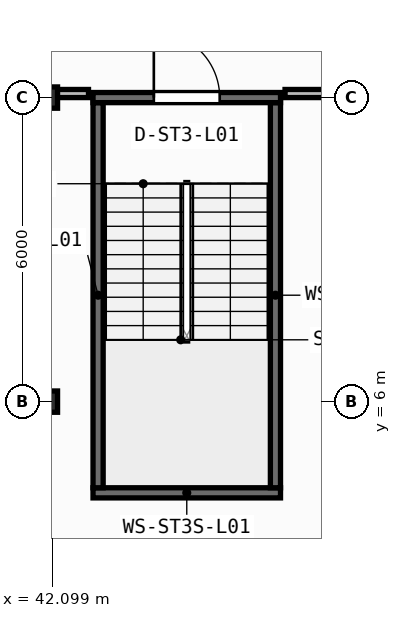
"""IFC4 building model, lengths in metres.
Left out: names, types, materials, properties, quantities, classifications, styles, units other than length and angle.
Written with IfcOpenShell. Run it as: python <this file> out.ifc"""

import sys

from ifc_helpers import new_model, si_unit, direction, frame, frame_2d, origin, origin_2d, place, context, subcontext, project, spatial, rectangle, i_section, extrude, element, fill, save


model = new_model("IFC4")
c1 = context("Model", 3, precision=1e-05, world=origin(), true_north=direction((0.0, 1.0)))
c2 = subcontext(c1, "Body", "Model", "MODEL_VIEW")
j1 = project(units=[si_unit("LENGTHUNIT", "METRE"), si_unit("PLANEANGLEUNIT", "RADIAN")], contexts=[c1])
p1 = place(None, origin())
s1 = spatial("IfcSite", under=j1, at=p1, CompositionType="ELEMENT")
p2 = place(p1, origin())
s2 = spatial("IfcBuilding", under=s1, at=p2, CompositionType="ELEMENT")
p3 = place(p2, frame((0.0, 0.0, 4.5)))
s3 = spatial("IfcBuildingStorey", under=s2, at=p3, CompositionType="ELEMENT", Elevation=4.5)
for number, where, z_axis, x_axis in (
    (1, (42.0, 6.0, 0.0), (0.0, 0.0, 1.0), (1.0, 0.0, 0.0)),
    (2, (42.0, 12.0, 0.0), (0.0, 0.0, 1.0), (1.0, 0.0, 0.0)),
):
    element("IfcColumn", number, at=place(p3, frame(where, z_axis=z_axis, x_axis=x_axis)), inside=s3, PredefinedType="COLUMN", context=c2, shape_type="SweptSolid", body=[
        extrude(i_section(OverallWidth=0.4, OverallDepth=0.42, WebThickness=0.025, FlangeThickness=0.04, at=origin_2d()), origin(), (0.0, 0.0, 1.0), 4.5),
    ])
p4 = place(p3, frame((42.9, 4.2, 0.0), z_axis=(0.0, 0.0, 1.0), x_axis=(1.0, 0.0, 0.0)))
e3 = element("IfcWall", 3, at=p4, inside=s3, PredefinedType="SHEAR", context=c2, shape_type="SweptSolid", body=[
    extrude(rectangle(XDim=3.7, YDim=0.2, at=frame_2d((1.85, 0.0))), origin(), (0.0, 0.0, 1.0), 4.25),
])
for number, where, z_axis, x_axis in (
    (4, (43.0, 4.3, 0.0), (0.0, 0.0, 1.0), (0.0, 1.0, 0.0)),
    (5, (46.5, 4.3, 0.0), (0.0, 0.0, 1.0), (0.0, 1.0, 0.0)),
):
    element("IfcWall", number, at=place(p3, frame(where, z_axis=z_axis, x_axis=x_axis)), inside=s3, PredefinedType="SHEAR", context=c2, shape_type="SweptSolid", body=[
        extrude(rectangle(XDim=7.6, YDim=0.2, at=frame_2d((3.8, 0.0))), origin(), (0.0, 0.0, 1.0), 4.25),
    ])
p5 = place(p3, frame((42.9, 12.0, 0.0), z_axis=(0.0, 0.0, 1.0), x_axis=(1.0, 0.0, 0.0)))
e6 = element("IfcWall", 6, at=p5, inside=s3, PredefinedType="SHEAR", context=c2, shape_type="SweptSolid", body=[
    extrude(rectangle(XDim=3.7, YDim=0.2, at=frame_2d((1.85, 0.0))), origin(), (0.0, 0.0, 1.0), 4.25),
])
p6 = place(p5, frame((1.2, 0.0, 0.0)))
e7 = element("IfcOpeningElement", 7, at=p6, cuts=e6, PredefinedType="OPENING", context=c2, shape_type="SweptSolid", body=[
    extrude(rectangle(XDim=1.3, YDim=2.15, at=frame_2d((0.65, 1.075))), frame((0.0, 0.11, 0.0), z_axis=(0.0, -1.0, 0.0), x_axis=(1.0, 0.0, 0.0)), (0.0, 0.0, 1.0), 0.22),
])
p7 = place(p3, frame((31.63, 12.08, 0.0), z_axis=(0.0, 0.0, 1.0), x_axis=(1.0, 0.0, 0.0)))
e8 = element("IfcWall", 8, at=p7, inside=s3, PredefinedType="PARTITIONING", context=c2, shape_type="SweptSolid", body=[
    extrude(rectangle(XDim=11.181, YDim=0.16, at=frame_2d((5.59, 0.0))), origin(), (0.0, 0.0, 1.0), 3.425),
])
p8 = place(p3, frame((46.689, 12.08, 0.0), z_axis=(0.0, 0.0, 1.0), x_axis=(1.0, 0.0, 0.0)))
e9 = element("IfcWall", 9, at=p8, inside=s3, PredefinedType="PARTITIONING", context=c2, shape_type="SweptSolid", body=[
    extrude(rectangle(XDim=2.843, YDim=0.16, at=frame_2d((1.421, 0.0))), origin(), (0.0, 0.0, 1.0), 3.425),
])
p9 = place(p6, origin())
e10 = element("IfcDoor", 10, at=p9, inside=s3, OperationType="SINGLE_SWING_LEFT", PredefinedType="DOOR", context=c2, shape_type="SweptSolid", body=[
    extrude(rectangle(XDim=1.3, YDim=2.15, at=frame_2d((0.65, 1.075))), frame((0.0, 0.025, 0.0), z_axis=(0.0, -1.0, 0.0), x_axis=(1.0, 0.0, 0.0)), (0.0, 0.0, 1.0), 0.05),
])
fill(e7, e10)
save(model, sys.argv[1])
